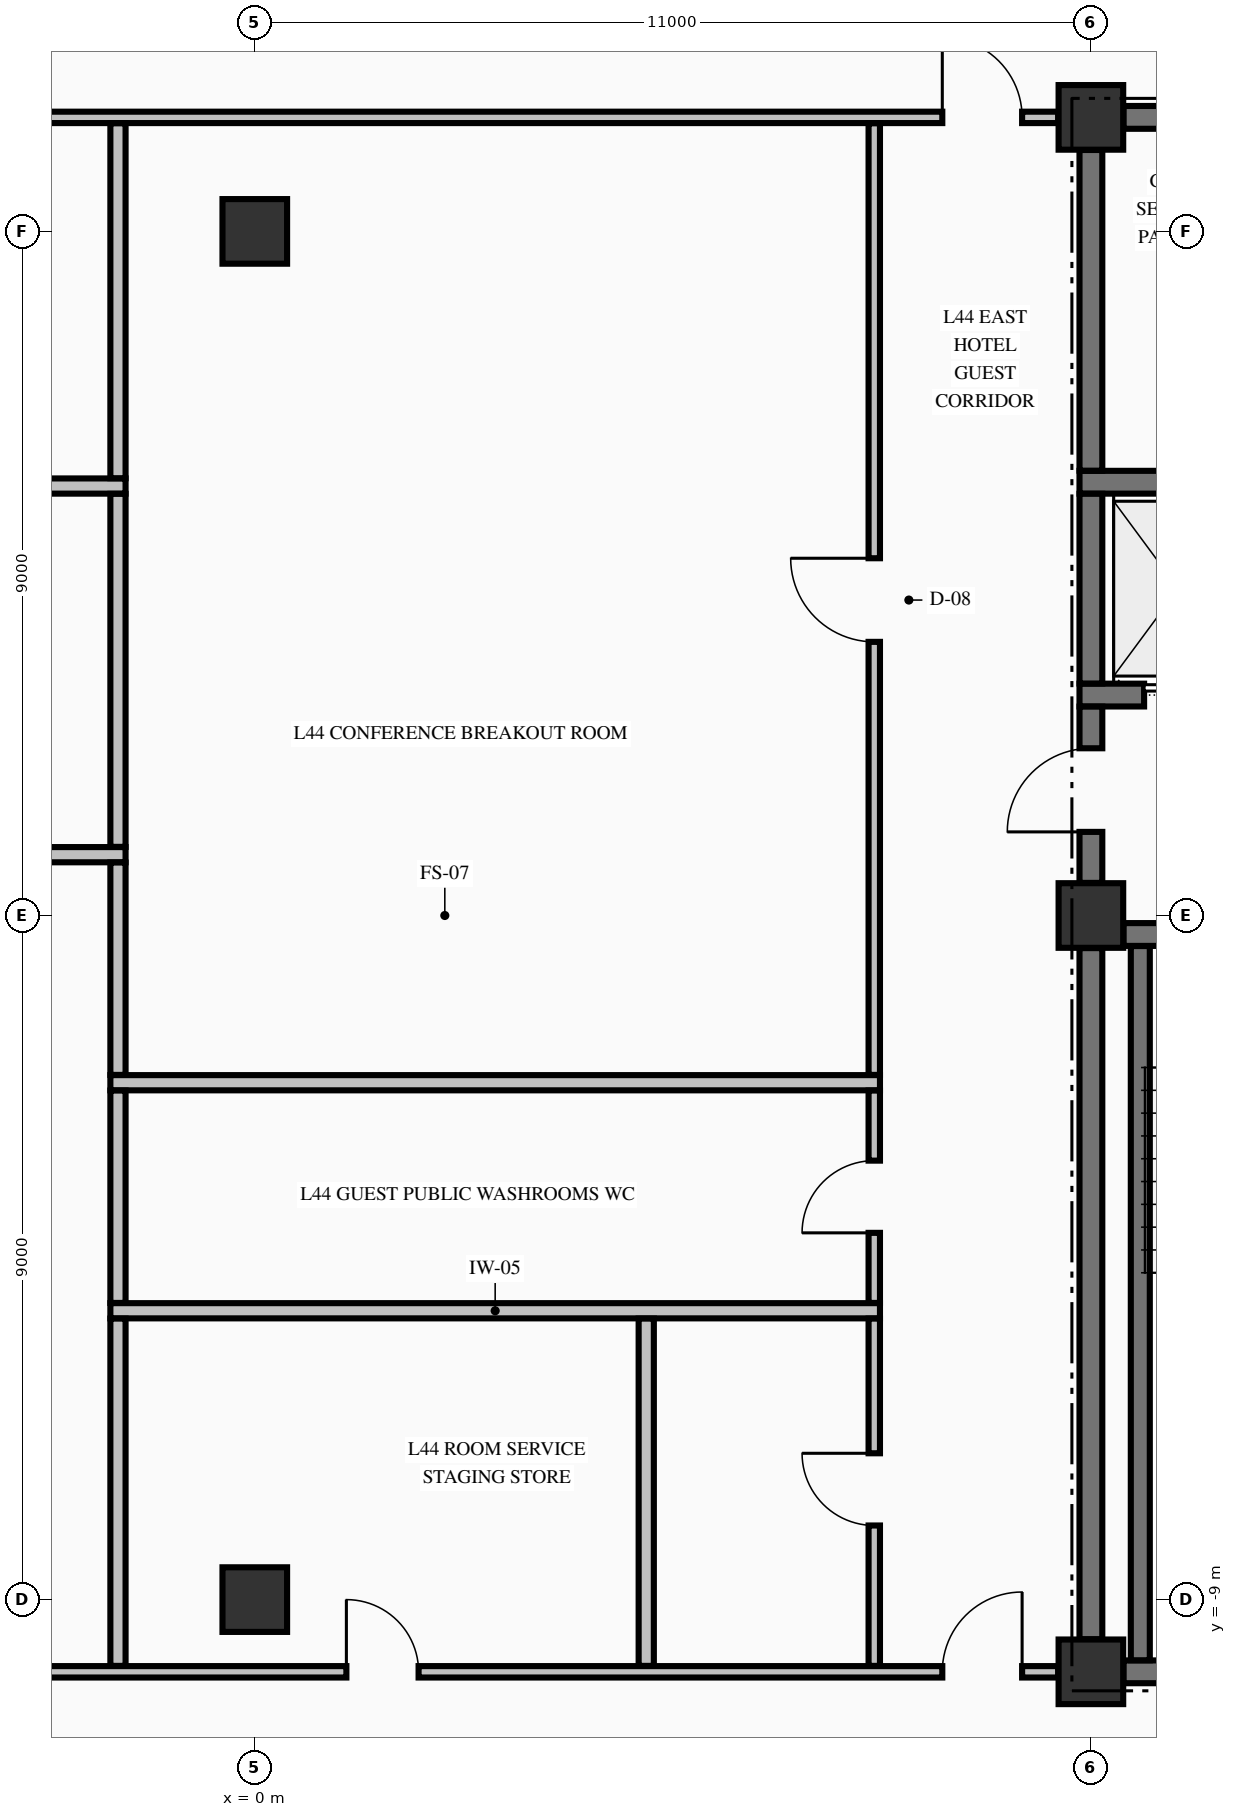
"""IFC4 building model, lengths in metres.
Left out: names, types, materials, properties, quantities, classifications, styles, units other than length and angle.
Written with IfcOpenShell. Run it as: python <this file> out.ifc"""

import sys

from ifc_helpers import new_model, si_unit, direction, frame, frame_2d, origin, origin_2d, place, context, subcontext, project, spatial, rectangle, extrude, element, fill, save


model = new_model("IFC4")
c1 = context("Model", 3, precision=1e-05, world=origin(), true_north=direction((0.0, 1.0)))
c2 = subcontext(c1, "Body", "Model", "MODEL_VIEW")
j1 = project(units=[si_unit("LENGTHUNIT", "METRE"), si_unit("PLANEANGLEUNIT", "RADIAN")], contexts=[c1])
p1 = place(None, origin())
s1 = spatial("IfcSite", under=j1, at=p1, CompositionType="ELEMENT")
p2 = place(p1, origin())
s2 = spatial("IfcBuilding", under=s1, at=p2, CompositionType="ELEMENT")
p3 = place(p2, frame((0.0, 0.0, 172.86)))
s3 = spatial("IfcBuildingStorey", under=s2, at=p3, CompositionType="ELEMENT", Elevation=172.86)
for number, where, z_axis, x_axis in (
    (1, (11.0, -9.95, -0.25), (0.0, 0.0, 1.0), (1.0, 0.0, 0.0)),
    (2, (11.0, 0.0, -0.25), (0.0, 0.0, 1.0), (1.0, 0.0, 0.0)),
    (3, (11.0, 10.5, -0.25), (0.0, 0.0, 1.0), (1.0, 0.0, 0.0)),
    (4, (0.0, -9.0, -0.25), (0.0, 0.0, 1.0), (1.0, 0.0, 0.0)),
    (5, (0.0, 9.0, -0.25), (0.0, 0.0, 1.0), (1.0, 0.0, 0.0)),
):
    element("IfcColumn", number, at=place(p3, frame(where, z_axis=z_axis, x_axis=x_axis)), inside=s3, PredefinedType="COLUMN", context=c2, shape_type="SweptSolid", body=[
        extrude(rectangle(XDim=0.85, YDim=0.85, at=origin_2d()), origin(), (0.0, 0.0, 1.0), 3.375),
    ])
p4 = place(p3, frame((11.429, -9.95, 0.0), z_axis=(0.0, 0.0, 1.0), x_axis=(1.0, 0.0, 0.0)))
e6 = element("IfcWall", 6, at=p4, inside=s3, PredefinedType="SHEAR", context=c2, shape_type="SweptSolid", body=[
    extrude(rectangle(XDim=3.271, YDim=0.3, at=frame_2d((1.635, 0.0))), origin(), (0.0, 0.0, 1.0), 3.125),
])
p5 = place(p3, frame((11.429, -0.25, 0.0), z_axis=(0.0, 0.0, 1.0), x_axis=(1.0, 0.0, 0.0)))
e7 = element("IfcWall", 7, at=p5, inside=s3, PredefinedType="SHEAR", context=c2, shape_type="SweptSolid", body=[
    extrude(rectangle(XDim=3.446, YDim=0.3, at=frame_2d((1.723, 0.0))), origin(), (0.0, 0.0, 1.0), 3.125),
])
p6 = place(p5, frame((1.171, 0.0, 0.0)))
e8 = element("IfcOpeningElement", 8, at=p6, cuts=e7, PredefinedType="OPENING", context=c2, shape_type="SweptSolid", body=[
    extrude(rectangle(XDim=1.1, YDim=2.15, at=frame_2d((0.55, 1.075))), frame((0.0, 0.16, 0.0), z_axis=(0.0, -1.0, 0.0), x_axis=(1.0, 0.0, 0.0)), (0.0, 0.0, 1.0), 0.32),
])
p7 = place(p3, frame((10.85, 2.9, 0.0), z_axis=(0.0, 0.0, 1.0), x_axis=(1.0, 0.0, 0.0)))
e9 = element("IfcWall", 9, at=p7, inside=s3, PredefinedType="SHEAR", context=c2, shape_type="SweptSolid", body=[
    extrude(rectangle(XDim=4.025, YDim=0.3, at=frame_2d((2.012, 0.0))), origin(), (0.0, 0.0, 1.0), 3.125),
])
p8 = place(p7, frame((0.85, 0.0, 0.0)))
e10 = element("IfcOpeningElement", 10, at=p8, cuts=e9, PredefinedType="OPENING", context=c2, shape_type="SweptSolid", body=[
    extrude(rectangle(XDim=1.1, YDim=2.2, at=frame_2d((0.55, 1.1))), frame((0.0, 0.16, 0.0), z_axis=(0.0, -1.0, 0.0), x_axis=(1.0, 0.0, 0.0)), (0.0, 0.0, 1.0), 0.32),
])
p9 = place(p3, frame((10.85, 5.7, 0.0), z_axis=(0.0, 0.0, 1.0), x_axis=(1.0, 0.0, 0.0)))
e11 = element("IfcWall", 11, at=p9, inside=s3, PredefinedType="SHEAR", context=c2, shape_type="SweptSolid", body=[
    extrude(rectangle(XDim=4.025, YDim=0.3, at=frame_2d((2.012, 0.0))), origin(), (0.0, 0.0, 1.0), 3.125),
])
p10 = place(p3, frame((11.429, 10.5, 0.0), z_axis=(0.0, 0.0, 1.0), x_axis=(1.0, 0.0, 0.0)))
e12 = element("IfcWall", 12, at=p10, inside=s3, PredefinedType="SHEAR", context=c2, shape_type="SweptSolid", body=[
    extrude(rectangle(XDim=3.271, YDim=0.3, at=frame_2d((1.635, 0.0))), origin(), (0.0, 0.0, 1.0), 3.125),
])
p11 = place(p10, frame((2.076, 0.0, 0.0)))
e13 = element("IfcOpeningElement", 13, at=p11, cuts=e12, PredefinedType="OPENING", context=c2, shape_type="SweptSolid", body=[
    extrude(rectangle(XDim=0.95, YDim=2.15, at=frame_2d((0.475, 1.075))), frame((0.0, 0.16, 0.0), z_axis=(0.0, -1.0, 0.0), x_axis=(1.0, 0.0, 0.0)), (0.0, 0.0, 1.0), 0.32),
])
p12 = place(p3, frame((-10.569, -9.95, 0.0), z_axis=(0.0, 0.0, 1.0), x_axis=(1.0, 0.0, 0.0)))
e14 = element("IfcWall", 14, at=p12, inside=s3, PredefinedType="PARTITIONING", context=c2, shape_type="SweptSolid", body=[
    extrude(rectangle(XDim=21.138, YDim=0.15, at=frame_2d((10.569, 0.0))), origin(), (0.0, 0.0, 1.0), 3.125),
])
p13 = place(p12, frame((0.474, 0.0, 0.0)))
e15 = element("IfcOpeningElement", 15, at=p13, cuts=e14, PredefinedType="OPENING", context=c2, shape_type="SweptSolid", body=[
    extrude(rectangle(XDim=1.05, YDim=2.15, at=frame_2d((0.525, 1.075))), frame((0.0, 0.085, 0.0), z_axis=(0.0, -1.0, 0.0), x_axis=(1.0, 0.0, 0.0)), (0.0, 0.0, 1.0), 0.17),
])
p14 = place(p12, frame((19.614, 0.0, 0.0)))
e16 = element("IfcOpeningElement", 16, at=p14, cuts=e14, PredefinedType="OPENING", context=c2, shape_type="SweptSolid", body=[
    extrude(rectangle(XDim=1.05, YDim=2.15, at=frame_2d((0.525, 1.075))), frame((0.0, 0.085, 0.0), z_axis=(0.0, -1.0, 0.0), x_axis=(1.0, 0.0, 0.0)), (0.0, 0.0, 1.0), 0.17),
])
p15 = place(p12, frame((11.774, 0.0, 0.0)))
e17 = element("IfcOpeningElement", 17, at=p15, cuts=e14, PredefinedType="OPENING", context=c2, shape_type="SweptSolid", body=[
    extrude(rectangle(XDim=0.95, YDim=2.15, at=frame_2d((0.475, 1.075))), frame((0.0, 0.085, 0.0), z_axis=(0.0, -1.0, 0.0), x_axis=(1.0, 0.0, 0.0)), (0.0, 0.0, 1.0), 0.17),
])
for number, where, z_axis, x_axis in (
    (18, (-1.9, -5.2, 0.0), (0.0, 0.0, 1.0), (1.0, 0.0, 0.0)),
    (19, (-1.9, -2.2, 0.0), (0.0, 0.0, 1.0), (1.0, 0.0, 0.0)),
):
    element("IfcWall", number, at=place(p3, frame(where, z_axis=z_axis, x_axis=x_axis)), inside=s3, PredefinedType="PARTITIONING", context=c2, shape_type="SweptSolid", body=[
        extrude(rectangle(XDim=10.125, YDim=0.2, at=frame_2d((5.062, 0.0))), origin(), (0.0, 0.0, 1.0), 3.125),
    ])
for number, where, z_axis, x_axis in (
    (20, (-8.225, 0.8, 0.0), (0.0, 0.0, 1.0), (1.0, 0.0, 0.0)),
    (21, (-8.225, 5.65, 0.0), (0.0, 0.0, 1.0), (1.0, 0.0, 0.0)),
):
    element("IfcWall", number, at=place(p3, frame(where, z_axis=z_axis, x_axis=x_axis)), inside=s3, PredefinedType="PARTITIONING", context=c2, shape_type="SweptSolid", body=[
        extrude(rectangle(XDim=6.525, YDim=0.2, at=frame_2d((3.263, 0.0))), origin(), (0.0, 0.0, 1.0), 3.125),
    ])
p16 = place(p3, frame((-10.569, 10.5, 0.0), z_axis=(0.0, 0.0, 1.0), x_axis=(1.0, 0.0, 0.0)))
e22 = element("IfcWall", 22, at=p16, inside=s3, PredefinedType="PARTITIONING", context=c2, shape_type="SweptSolid", body=[
    extrude(rectangle(XDim=21.138, YDim=0.15, at=frame_2d((10.569, 0.0))), origin(), (0.0, 0.0, 1.0), 3.125),
])
p17 = place(p16, frame((0.474, 0.0, 0.0)))
e23 = element("IfcOpeningElement", 23, at=p17, cuts=e22, PredefinedType="OPENING", context=c2, shape_type="SweptSolid", body=[
    extrude(rectangle(XDim=1.05, YDim=2.15, at=frame_2d((0.525, 1.075))), frame((0.0, 0.085, 0.0), z_axis=(0.0, -1.0, 0.0), x_axis=(1.0, 0.0, 0.0)), (0.0, 0.0, 1.0), 0.17),
])
p18 = place(p16, frame((19.614, 0.0, 0.0)))
e24 = element("IfcOpeningElement", 24, at=p18, cuts=e22, PredefinedType="OPENING", context=c2, shape_type="SweptSolid", body=[
    extrude(rectangle(XDim=1.05, YDim=2.15, at=frame_2d((0.525, 1.075))), frame((0.0, 0.085, 0.0), z_axis=(0.0, -1.0, 0.0), x_axis=(1.0, 0.0, 0.0)), (0.0, 0.0, 1.0), 0.17),
])
p19 = place(p3, frame((11.0, -9.521, 0.0), z_axis=(0.0, 0.0, 1.0), x_axis=(0.0, 1.0, 0.0)))
e25 = element("IfcWall", 25, at=p19, inside=s3, PredefinedType="SHEAR", context=c2, shape_type="SweptSolid", body=[
    extrude(rectangle(XDim=9.092, YDim=0.3, at=frame_2d((4.546, 0.0))), origin(), (0.0, 0.0, 1.0), 3.125),
])
p20 = place(p3, frame((11.0, 0.429, 0.0), z_axis=(0.0, 0.0, 1.0), x_axis=(0.0, 1.0, 0.0)))
e26 = element("IfcWall", 26, at=p20, inside=s3, PredefinedType="SHEAR", context=c2, shape_type="SweptSolid", body=[
    extrude(rectangle(XDim=2.319, YDim=0.3, at=frame_2d((1.16, 0.0))), origin(), (0.0, 0.0, 1.0), 3.125),
])
p21 = place(p20, frame((0.671, 0.0, 0.0)))
e27 = element("IfcOpeningElement", 27, at=p21, cuts=e26, PredefinedType="OPENING", context=c2, shape_type="SweptSolid", body=[
    extrude(rectangle(XDim=1.1, YDim=2.15, at=frame_2d((0.55, 1.075))), frame((0.0, 0.16, 0.0), z_axis=(0.0, -1.0, 0.0), x_axis=(1.0, 0.0, 0.0)), (0.0, 0.0, 1.0), 0.32),
])
p22 = place(p3, frame((11.0, 3.052, 0.0), z_axis=(0.0, 0.0, 1.0), x_axis=(0.0, 1.0, 0.0)))
e28 = element("IfcWall", 28, at=p22, inside=s3, PredefinedType="SHEAR", context=c2, shape_type="SweptSolid", body=[
    extrude(rectangle(XDim=2.496, YDim=0.3, at=frame_2d((1.248, 0.0))), origin(), (0.0, 0.0, 1.0), 3.125),
])
p23 = place(p3, frame((11.0, 5.852, 0.0), z_axis=(0.0, 0.0, 1.0), x_axis=(0.0, 1.0, 0.0)))
e29 = element("IfcWall", 29, at=p23, inside=s3, PredefinedType="SHEAR", context=c2, shape_type="SweptSolid", body=[
    extrude(rectangle(XDim=4.219, YDim=0.3, at=frame_2d((2.109, 0.0))), origin(), (0.0, 0.0, 1.0), 3.125),
])
p24 = place(p3, frame((11.65, -9.798, 0.0), z_axis=(0.0, 0.0, 1.0), x_axis=(0.0, 1.0, 0.0)))
e30 = element("IfcWall", 30, at=p24, inside=s3, PredefinedType="SOLIDWALL", context=c2, shape_type="SweptSolid", body=[
    extrude(rectangle(XDim=9.396, YDim=0.25, at=frame_2d((4.698, 0.0))), origin(), (0.0, 0.0, 1.0), 3.125),
])
p25 = place(p3, frame((-1.8, -9.872, 0.0), z_axis=(0.0, 0.0, 1.0), x_axis=(0.0, 1.0, 0.0)))
e31 = element("IfcWall", 31, at=p25, inside=s3, PredefinedType="PARTITIONING", context=c2, shape_type="SweptSolid", body=[
    extrude(rectangle(XDim=4.569, YDim=0.2, at=frame_2d((2.285, 0.0))), origin(), (0.0, 0.0, 1.0), 3.125),
])
for number, where, z_axis, x_axis in (
    (32, (-1.8, -5.097, 0.0), (0.0, 0.0, 1.0), (0.0, 1.0, 0.0)),
    (33, (-1.8, -2.097, 0.0), (0.0, 0.0, 1.0), (0.0, 1.0, 0.0)),
):
    element("IfcWall", number, at=place(p3, frame(where, z_axis=z_axis, x_axis=x_axis)), inside=s3, PredefinedType="PARTITIONING", context=c2, shape_type="SweptSolid", body=[
        extrude(rectangle(XDim=2.794, YDim=0.2, at=frame_2d((1.397, 0.0))), origin(), (0.0, 0.0, 1.0), 3.125),
    ])
p26 = place(p3, frame((-1.8, 0.903, 0.0), z_axis=(0.0, 0.0, 1.0), x_axis=(0.0, 1.0, 0.0)))
e34 = element("IfcWall", 34, at=p26, inside=s3, PredefinedType="PARTITIONING", context=c2, shape_type="SweptSolid", body=[
    extrude(rectangle(XDim=4.644, YDim=0.2, at=frame_2d((2.322, 0.0))), origin(), (0.0, 0.0, 1.0), 3.125),
])
p27 = place(p3, frame((-1.8, 5.753, 0.0), z_axis=(0.0, 0.0, 1.0), x_axis=(0.0, 1.0, 0.0)))
e35 = element("IfcWall", 35, at=p27, inside=s3, PredefinedType="PARTITIONING", context=c2, shape_type="SweptSolid", body=[
    extrude(rectangle(XDim=4.669, YDim=0.2, at=frame_2d((2.334, 0.0))), origin(), (0.0, 0.0, 1.0), 3.125),
])
p28 = place(p3, frame((5.15, -9.872, 0.0), z_axis=(0.0, 0.0, 1.0), x_axis=(0.0, 1.0, 0.0)))
e36 = element("IfcWall", 36, at=p28, inside=s3, PredefinedType="PARTITIONING", context=c2, shape_type="SweptSolid", body=[
    extrude(rectangle(XDim=4.569, YDim=0.2, at=frame_2d((2.285, 0.0))), origin(), (0.0, 0.0, 1.0), 3.125),
])
p29 = place(p3, frame((8.15, -9.872, 0.0), z_axis=(0.0, 0.0, 1.0), x_axis=(0.0, 1.0, 0.0)))
e37 = element("IfcWall", 37, at=p29, inside=s3, PredefinedType="PARTITIONING", context=c2, shape_type="SweptSolid", body=[
    extrude(rectangle(XDim=4.569, YDim=0.15, at=frame_2d((2.285, 0.0))), origin(), (0.0, 0.0, 1.0), 3.125),
])
p30 = place(p29, frame((1.847, 0.0, 0.0)))
e38 = element("IfcOpeningElement", 38, at=p30, cuts=e37, PredefinedType="OPENING", context=c2, shape_type="SweptSolid", body=[
    extrude(rectangle(XDim=0.95, YDim=2.15, at=frame_2d((0.475, 1.075))), frame((0.0, 0.085, 0.0), z_axis=(0.0, -1.0, 0.0), x_axis=(1.0, 0.0, 0.0)), (0.0, 0.0, 1.0), 0.17),
])
p31 = place(p3, frame((8.15, -5.097, 0.0), z_axis=(0.0, 0.0, 1.0), x_axis=(0.0, 1.0, 0.0)))
e39 = element("IfcWall", 39, at=p31, inside=s3, PredefinedType="PARTITIONING", context=c2, shape_type="SweptSolid", body=[
    extrude(rectangle(XDim=2.794, YDim=0.15, at=frame_2d((1.397, 0.0))), origin(), (0.0, 0.0, 1.0), 3.125),
])
p32 = place(p31, frame((0.922, 0.0, 0.0)))
e40 = element("IfcOpeningElement", 40, at=p32, cuts=e39, PredefinedType="OPENING", context=c2, shape_type="SweptSolid", body=[
    extrude(rectangle(XDim=0.95, YDim=2.15, at=frame_2d((0.475, 1.075))), frame((0.0, 0.085, 0.0), z_axis=(0.0, -1.0, 0.0), x_axis=(1.0, 0.0, 0.0)), (0.0, 0.0, 1.0), 0.17),
])
p33 = place(p3, frame((8.15, -2.097, 0.0), z_axis=(0.0, 0.0, 1.0), x_axis=(0.0, 1.0, 0.0)))
e41 = element("IfcWall", 41, at=p33, inside=s3, PredefinedType="PARTITIONING", context=c2, shape_type="SweptSolid", body=[
    extrude(rectangle(XDim=12.519, YDim=0.15, at=frame_2d((6.26, 0.0))), origin(), (0.0, 0.0, 1.0), 3.125),
])
p34 = place(p33, frame((5.697, 0.0, 0.0)))
e42 = element("IfcOpeningElement", 42, at=p34, cuts=e41, PredefinedType="OPENING", context=c2, shape_type="SweptSolid", body=[
    extrude(rectangle(XDim=1.1, YDim=2.15, at=frame_2d((0.55, 1.075))), frame((0.0, 0.085, 0.0), z_axis=(0.0, -1.0, 0.0), x_axis=(1.0, 0.0, 0.0)), (0.0, 0.0, 1.0), 0.17),
])
p35 = place(p21, origin())
e43 = element("IfcDoor", 43, at=p35, inside=s3, OperationType="SINGLE_SWING_LEFT", PredefinedType="DOOR", context=c2, shape_type="SweptSolid", body=[
    extrude(rectangle(XDim=1.1, YDim=2.15, at=frame_2d((0.55, 1.075))), frame((0.0, 0.025, 0.0), z_axis=(0.0, -1.0, 0.0), x_axis=(1.0, 0.0, 0.0)), (0.0, 0.0, 1.0), 0.05),
])
fill(e27, e43)
p36 = place(p8, origin())
e44 = element("IfcDoor", 44, at=p36, inside=s3, OperationType="SLIDING_TO_RIGHT", PredefinedType="DOOR", context=c2, shape_type="SweptSolid", body=[
    extrude(rectangle(XDim=1.1, YDim=2.2, at=frame_2d((0.55, 1.1))), frame((0.0, 0.025, 0.0), z_axis=(0.0, -1.0, 0.0), x_axis=(1.0, 0.0, 0.0)), (0.0, 0.0, 1.0), 0.05),
])
fill(e10, e44)
p37 = place(p18, origin())
e45 = element("IfcDoor", 45, at=p37, inside=s3, OperationType="SINGLE_SWING_LEFT", PredefinedType="DOOR", context=c2, shape_type="SweptSolid", body=[
    extrude(rectangle(XDim=1.05, YDim=2.15, at=frame_2d((0.525, 1.075))), frame((0.0, 0.025, 0.0), z_axis=(0.0, -1.0, 0.0), x_axis=(1.0, 0.0, 0.0)), (0.0, 0.0, 1.0), 0.05),
])
fill(e24, e45)
p38 = place(p14, origin())
e46 = element("IfcDoor", 46, at=p38, inside=s3, OperationType="SINGLE_SWING_RIGHT", PredefinedType="DOOR", context=c2, shape_type="SweptSolid", body=[
    extrude(rectangle(XDim=1.05, YDim=2.15, at=frame_2d((0.525, 1.075))), frame((0.0, 0.025, 0.0), z_axis=(0.0, -1.0, 0.0), x_axis=(1.0, 0.0, 0.0)), (0.0, 0.0, 1.0), 0.05),
])
fill(e16, e46)
p39 = place(p34, origin())
e47 = element("IfcDoor", 47, at=p39, inside=s3, OperationType="SINGLE_SWING_RIGHT", PredefinedType="DOOR", context=c2, shape_type="SweptSolid", body=[
    extrude(rectangle(XDim=1.1, YDim=2.15, at=frame_2d((0.55, 1.075))), frame((0.0, 0.025, 0.0), z_axis=(0.0, -1.0, 0.0), x_axis=(1.0, 0.0, 0.0)), (0.0, 0.0, 1.0), 0.05),
])
fill(e42, e47)
p40 = place(p32, origin())
e48 = element("IfcDoor", 48, at=p40, inside=s3, OperationType="SINGLE_SWING_LEFT", PredefinedType="DOOR", context=c2, shape_type="SweptSolid", body=[
    extrude(rectangle(XDim=0.95, YDim=2.15, at=frame_2d((0.475, 1.075))), frame((0.0, 0.025, 0.0), z_axis=(0.0, -1.0, 0.0), x_axis=(1.0, 0.0, 0.0)), (0.0, 0.0, 1.0), 0.05),
])
fill(e40, e48)
p41 = place(p30, origin())
e49 = element("IfcDoor", 49, at=p41, inside=s3, OperationType="SINGLE_SWING_RIGHT", PredefinedType="DOOR", context=c2, shape_type="SweptSolid", body=[
    extrude(rectangle(XDim=0.95, YDim=2.15, at=frame_2d((0.475, 1.075))), frame((0.0, 0.025, 0.0), z_axis=(0.0, -1.0, 0.0), x_axis=(1.0, 0.0, 0.0)), (0.0, 0.0, 1.0), 0.05),
])
fill(e38, e49)
p42 = place(p15, origin())
e50 = element("IfcDoor", 50, at=p42, inside=s3, OperationType="SINGLE_SWING_LEFT", PredefinedType="DOOR", context=c2, shape_type="SweptSolid", body=[
    extrude(rectangle(XDim=0.95, YDim=2.15, at=frame_2d((0.475, 1.075))), frame((0.0, 0.025, 0.0), z_axis=(0.0, -1.0, 0.0), x_axis=(1.0, 0.0, 0.0)), (0.0, 0.0, 1.0), 0.05),
])
fill(e17, e50)
save(model, sys.argv[1])
